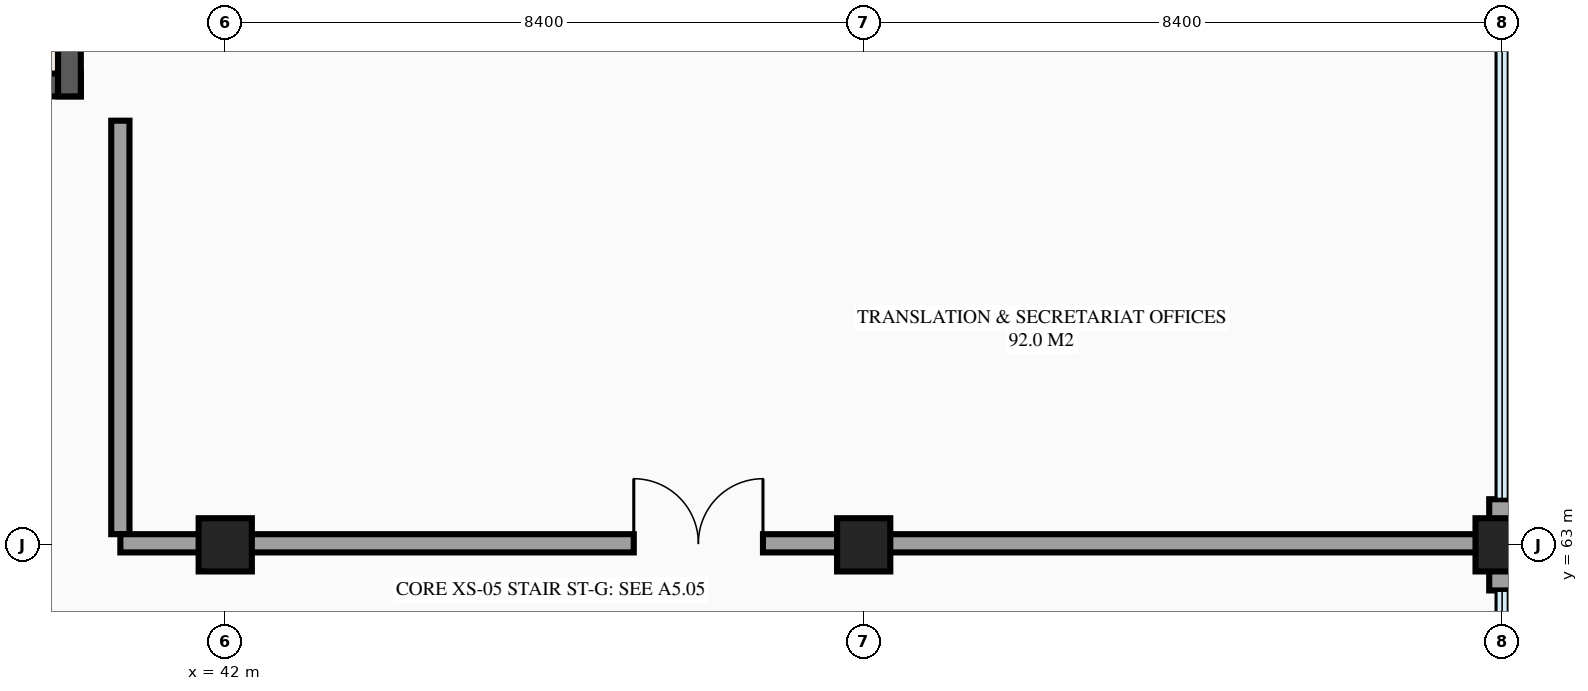
"""IFC4 building model, lengths in metres.
Left out: names, types, materials, properties, quantities, classifications, styles, units other than length and angle.
Written with IfcOpenShell. Run it as: python <this file> out.ifc"""

import sys

from ifc_helpers import new_model, si_unit, direction, frame, frame_2d, origin, origin_2d, place, context, subcontext, project, spatial, rectangle, extrude, element, fill, save


model = new_model("IFC4")
c1 = context("Model", 3, precision=1e-05, world=origin(), true_north=direction((0.0, 1.0)))
c2 = subcontext(c1, "Body", "Model", "MODEL_VIEW")
j1 = project(units=[si_unit("LENGTHUNIT", "METRE"), si_unit("PLANEANGLEUNIT", "RADIAN")], contexts=[c1])
p1 = place(None, origin())
s1 = spatial("IfcSite", under=j1, at=p1, CompositionType="ELEMENT")
p2 = place(p1, origin())
s2 = spatial("IfcBuilding", under=s1, at=p2, CompositionType="ELEMENT")
p3 = place(p2, frame((0.0, 0.0, 9.9)))
s3 = spatial("IfcBuildingStorey", under=s2, at=p3, CompositionType="ELEMENT", Elevation=9.9)
for number, where, z_axis, x_axis in (
    (1, (42.0, 63.0, 0.0), (0.0, 0.0, 1.0), (1.0, 0.0, 0.0)),
    (2, (50.4, 63.0, 0.0), (0.0, 0.0, 1.0), (1.0, 0.0, 0.0)),
    (3, (58.8, 63.0, 0.0), (0.0, 0.0, 1.0), (1.0, 0.0, 0.0)),
):
    element("IfcColumn", number, at=place(p3, frame(where, z_axis=z_axis, x_axis=x_axis)), inside=s3, PredefinedType="COLUMN", context=c2, shape_type="SweptSolid", body=[
        extrude(rectangle(XDim=0.7, YDim=0.7, at=origin_2d()), origin(), (0.0, 0.0, 1.0), 4.2),
    ])
for number, where, z_axis, x_axis in (
    (4, (58.8, 62.4, 0.0), (0.0, 0.0, 1.0), (0.0, 1.0, 0.0)),
    (5, (58.8, 63.0, 0.0), (0.0, 0.0, 1.0), (0.0, 1.0, 0.0)),
):
    element("IfcWall", number, at=place(p3, frame(where, z_axis=z_axis, x_axis=x_axis)), inside=s3, PredefinedType="STANDARD", context=c2, shape_type="SweptSolid", body=[
        extrude(rectangle(XDim=0.6, YDim=0.34, at=frame_2d((0.3, 0.0))), origin(), (0.0, 0.0, 1.0), 4.2),
    ])
p4 = place(p3, frame((34.9, 69.05, 0.0), z_axis=(0.0, 0.0, 1.0), x_axis=(1.0, 0.0, 0.0)))
e6 = element("IfcWall", 6, at=p4, inside=s3, PredefinedType="SHEAR", context=c2, shape_type="SweptSolid", body=[
    extrude(rectangle(XDim=5.2, YDim=0.3, at=frame_2d((2.6, 0.0))), origin(), (0.0, 0.0, 1.0), 2.65),
])
p5 = place(p3, frame((39.95, 68.9, 0.0), z_axis=(0.0, 0.0, 1.0), x_axis=(0.0, 1.0, 0.0)))
e7 = element("IfcWall", 7, at=p5, inside=s3, PredefinedType="SHEAR", context=c2, shape_type="SweptSolid", body=[
    extrude(rectangle(XDim=8.84, YDim=0.3, at=frame_2d((4.42, 0.0))), origin(), (0.0, 0.0, 1.0), 2.65),
])
p6 = place(p3, frame((42.0, 63.02, 0.0), z_axis=(0.0, 0.0, 1.0), x_axis=(1.0, 0.0, 0.0)))
e8 = element("IfcWall", 8, at=p6, inside=s3, PredefinedType="PARTITIONING", context=c2, shape_type="SweptSolid", body=[
    extrude(rectangle(XDim=16.63, YDim=0.24, at=frame_2d((8.315, 0.0))), origin(), (0.0, 0.0, 1.0), 3.26),
])
p7 = place(p6, frame((5.375, 0.0, 0.0)))
e9 = element("IfcOpeningElement", 9, at=p7, cuts=e8, PredefinedType="OPENING", context=c2, shape_type="SweptSolid", body=[
    extrude(rectangle(XDim=1.7, YDim=2.2, at=frame_2d((0.85, 1.1))), frame((0.0, 0.13, 0.0), z_axis=(0.0, -1.0, 0.0), x_axis=(1.0, 0.0, 0.0)), (0.0, 0.0, 1.0), 0.26),
])
p8 = place(p3, frame((40.62, 63.14, 0.0), z_axis=(0.0, 0.0, 1.0), x_axis=(0.0, 1.0, 0.0)))
e10 = element("IfcWall", 10, at=p8, inside=s3, PredefinedType="PARTITIONING", context=c2, shape_type="SweptSolid", body=[
    extrude(rectangle(XDim=5.44, YDim=0.24, at=frame_2d((2.72, 0.0))), origin(), (0.0, 0.0, 1.0), 3.955),
])
p9 = place(p3, frame((40.62, 63.02, 0.0), z_axis=(0.0, 0.0, 1.0), x_axis=(1.0, 0.0, 0.0)))
e11 = element("IfcWall", 11, at=p9, inside=s3, PredefinedType="PARTITIONING", context=c2, shape_type="SweptSolid", body=[
    extrude(rectangle(XDim=1.38, YDim=0.24, at=frame_2d((0.69, 0.0))), origin(), (0.0, 0.0, 1.0), 3.501),
])
p10 = place(p7, origin())
e12 = element("IfcDoor", 12, at=p10, inside=s3, OperationType="DOUBLE_DOOR_SINGLE_SWING", PredefinedType="DOOR", context=c2, shape_type="SweptSolid", body=[
    extrude(rectangle(XDim=1.7, YDim=2.2, at=frame_2d((0.85, 1.1))), frame((0.0, 0.025, 0.0), z_axis=(0.0, -1.0, 0.0), x_axis=(1.0, 0.0, 0.0)), (0.0, 0.0, 1.0), 0.05),
])
fill(e9, e12)
save(model, sys.argv[1])
